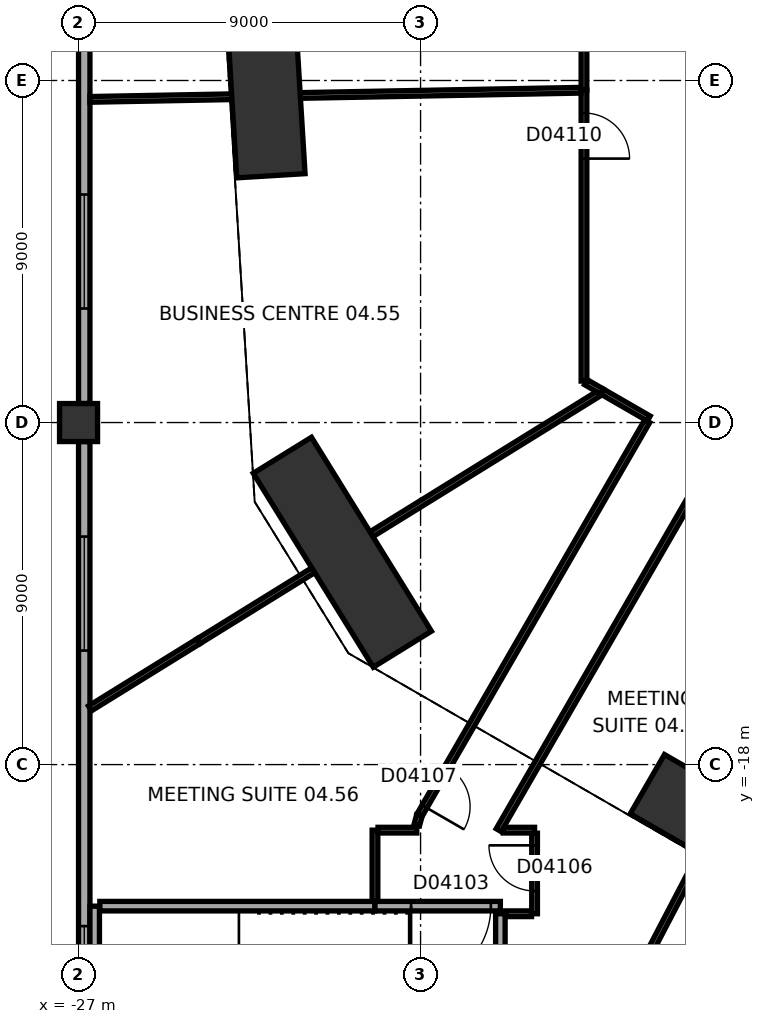
"""IFC4 building model, lengths in metres.
Left out: names, types, materials, properties, quantities, classifications, styles, units other than length and angle.
Written with IfcOpenShell. Run it as: python <this file> out.ifc"""

import sys

from ifc_helpers import new_model, si_unit, direction, frame, frame_2d, origin, origin_2d, place, context, subcontext, project, spatial, rectangle, extrude, element, fill, save


model = new_model("IFC4")
c1 = context("Model", 3, precision=1e-05, world=origin(), true_north=direction((0.0, 1.0)))
c2 = subcontext(c1, "Body", "Model", "MODEL_VIEW")
j1 = project(units=[si_unit("LENGTHUNIT", "METRE"), si_unit("PLANEANGLEUNIT", "RADIAN")], contexts=[c1])
p1 = place(None, origin())
s1 = spatial("IfcSite", under=j1, at=p1, CompositionType="ELEMENT")
p2 = place(p1, origin())
s2 = spatial("IfcBuilding", under=s1, at=p2, CompositionType="ELEMENT")
p3 = place(p2, frame((0.0, 0.0, 29.0)))
s3 = spatial("IfcBuildingStorey", under=s2, at=p3, CompositionType="ELEMENT", Elevation=29.0)
p4 = place(p3, frame((-22.066, -0.411, 0.0), z_axis=(0.0, 0.0, 1.0), x_axis=(0.061046797461, -0.99813490497, 0.0)))
e1 = element("IfcColumn", 1, at=p4, inside=s3, PredefinedType="COLUMN", context=c2, shape_type="SweptSolid", body=[
    extrude(rectangle(XDim=4.2, YDim=1.8, at=origin_2d()), origin(), (0.0, 0.0, 1.0), 5.5),
])
p5 = place(p3, frame((-20.058, -12.413, 0.0), z_axis=(0.0, 0.0, 1.0), x_axis=(0.526202050444, -0.850359572245, 0.0)))
e2 = element("IfcColumn", 2, at=p5, inside=s3, PredefinedType="COLUMN", context=c2, shape_type="SweptSolid", body=[
    extrude(rectangle(XDim=6.0, YDim=1.8, at=origin_2d()), origin(), (0.0, 0.0, 1.0), 5.5),
])
p6 = place(p3, frame((-10.213, -19.564, 0.0), z_axis=(0.0, 0.0, 1.0), x_axis=(0.866028021766, -0.499995465495, 0.0)))
e3 = element("IfcColumn", 3, at=p6, inside=s3, PredefinedType="COLUMN", context=c2, shape_type="SweptSolid", body=[
    extrude(rectangle(XDim=4.2, YDim=1.8, at=origin_2d()), origin(), (0.0, 0.0, 1.0), 5.5),
])
p7 = place(p3, frame((-27.0, -9.0, 0.0), z_axis=(0.0, 0.0, 1.0), x_axis=(1.0, 0.0, 0.0)))
e4 = element("IfcColumn", 4, at=p7, inside=s3, PredefinedType="COLUMN", context=c2, shape_type="SweptSolid", body=[
    extrude(rectangle(XDim=1.0, YDim=1.0, at=origin_2d()), origin(), (0.0, 0.0, 1.0), 5.5),
])
p8 = place(p3, frame((-26.85, 8.5, 0.0), z_axis=(0.0, 0.0, 1.0), x_axis=(0.0, -1.0, 0.0)))
e5 = element("IfcWall", 5, at=p8, inside=s3, PredefinedType="STANDARD", context=c2, shape_type="SweptSolid", body=[
    extrude(rectangle(XDim=17.0, YDim=0.3, at=frame_2d((8.5, 0.0))), origin(), (0.0, 0.0, 1.0), 3.95),
])
p9 = place(p8, frame((2.5, 0.0, 1.0)))
e6 = element("IfcOpeningElement", 6, at=p9, cuts=e5, PredefinedType="OPENING", context=c2, shape_type="SweptSolid", body=[
    extrude(rectangle(XDim=3.0, YDim=2.6, at=frame_2d((1.5, 1.3))), frame((0.0, 0.16, 0.0), z_axis=(0.0, -1.0, 0.0), x_axis=(1.0, 0.0, 0.0)), (0.0, 0.0, 1.0), 0.32),
])
p10 = place(p8, frame((11.5, 0.0, 1.0)))
e7 = element("IfcOpeningElement", 7, at=p10, cuts=e5, PredefinedType="OPENING", context=c2, shape_type="SweptSolid", body=[
    extrude(rectangle(XDim=3.0, YDim=2.6, at=frame_2d((1.5, 1.3))), frame((0.0, 0.16, 0.0), z_axis=(0.0, -1.0, 0.0), x_axis=(1.0, 0.0, 0.0)), (0.0, 0.0, 1.0), 0.32),
])
p11 = place(p3, frame((-26.85, -9.5, 0.0), z_axis=(0.0, 0.0, 1.0), x_axis=(0.0, -1.0, 0.0)))
e8 = element("IfcWall", 8, at=p11, inside=s3, PredefinedType="STANDARD", context=c2, shape_type="SweptSolid", body=[
    extrude(rectangle(XDim=17.0, YDim=0.3, at=frame_2d((8.5, 0.0))), origin(), (0.0, 0.0, 1.0), 3.95),
])
p12 = place(p11, frame((2.5, 0.0, 1.0)))
e9 = element("IfcOpeningElement", 9, at=p12, cuts=e8, PredefinedType="OPENING", context=c2, shape_type="SweptSolid", body=[
    extrude(rectangle(XDim=3.0, YDim=2.6, at=frame_2d((1.5, 1.3))), frame((0.0, 0.16, 0.0), z_axis=(0.0, -1.0, 0.0), x_axis=(1.0, 0.0, 0.0)), (0.0, 0.0, 1.0), 0.32),
])
p13 = place(p11, frame((12.75, 0.0, 1.0)))
e10 = element("IfcOpeningElement", 10, at=p13, cuts=e8, PredefinedType="OPENING", context=c2, shape_type="SweptSolid", body=[
    extrude(rectangle(XDim=3.0, YDim=2.6, at=frame_2d((1.5, 1.3))), frame((0.0, 0.16, 0.0), z_axis=(0.0, -1.0, 0.0), x_axis=(1.0, 0.0, 0.0)), (0.0, 0.0, 1.0), 0.32),
])
p14 = place(p3, frame((-12.686, -24.3, 0.0), z_axis=(0.0, 0.0, 1.0), x_axis=(0.462800821993, 0.88646229427, 0.0)))
e11 = element("IfcWall", 11, at=p14, inside=s3, PredefinedType="PARTITIONING", context=c2, shape_type="SweptSolid", body=[
    extrude(rectangle(XDim=4.441, YDim=0.15, at=frame_2d((2.221, 0.0))), origin(), (0.0, 0.0, 1.0), 5.15),
])
p15 = place(p3, frame((-15.9, -21.925, 0.0), z_axis=(0.0, 0.0, 1.0), x_axis=(0.0, -1.0, 0.0)))
e12 = element("IfcWall", 12, at=p15, inside=s3, PredefinedType="SOLIDWALL", context=c2, shape_type="SweptSolid", body=[
    extrude(rectangle(XDim=4.515, YDim=0.25, at=frame_2d((2.257, 0.0))), origin(), (0.0, 0.0, 1.0), 5.15),
])
p16 = place(p3, frame((-15.08, -21.925, 0.0), z_axis=(0.0, 0.0, 1.0), x_axis=(-1.0, 0.0, 0.0)))
e13 = element("IfcWall", 13, at=p16, inside=s3, PredefinedType="PARTITIONING", context=c2, shape_type="SweptSolid", body=[
    extrude(rectangle(XDim=0.68, YDim=0.15, at=frame_2d((0.34, 0.0))), origin(), (0.0, 0.0, 1.0), 5.15),
])
p17 = place(p3, frame((-26.44, -21.725, 0.0), z_axis=(0.0, 0.0, 1.0), x_axis=(1.0, 0.0, 0.0)))
e14 = element("IfcWall", 14, at=p17, inside=s3, PredefinedType="SOLIDWALL", context=c2, shape_type="SweptSolid", body=[
    extrude(rectangle(XDim=7.24, YDim=0.25, at=frame_2d((3.62, 0.0))), origin(), (0.0, 0.0, 1.0), 5.15),
])
p18 = place(p3, frame((-19.2, -21.725, 0.0), z_axis=(0.0, 0.0, 1.0), x_axis=(1.0, 0.0, 0.0)))
e15 = element("IfcWall", 15, at=p18, inside=s3, PredefinedType="SOLIDWALL", context=c2, shape_type="SweptSolid", body=[
    extrude(rectangle(XDim=3.3, YDim=0.25, at=frame_2d((1.65, 0.0))), origin(), (0.0, 0.0, 1.0), 5.15),
])
p19 = place(p18, frame((0.95, 0.0, 0.0)))
e16 = element("IfcOpeningElement", 16, at=p19, cuts=e15, PredefinedType="OPENING", context=c2, shape_type="SweptSolid", body=[
    extrude(rectangle(XDim=2.1, YDim=2.4, at=frame_2d((1.05, 1.2))), frame((0.0, 0.135, 0.0), z_axis=(0.0, -1.0, 0.0), x_axis=(1.0, 0.0, 0.0)), (0.0, 0.0, 1.0), 0.27),
])
p20 = place(p3, frame((-19.2, -21.585, 0.0), z_axis=(0.0, 0.0, 1.0), x_axis=(0.0, 1.0, 0.0)))
e17 = element("IfcWall", 17, at=p20, inside=s3, PredefinedType="PARTITIONING", context=c2, shape_type="SweptSolid", body=[
    extrude(rectangle(XDim=1.86, YDim=0.15, at=frame_2d((0.93, 0.0))), origin(), (0.0, 0.0, 1.0), 5.15),
])
p21 = place(p3, frame((-15.0, -19.805, 0.0), z_axis=(0.0, 0.0, 1.0), x_axis=(0.0, -1.0, 0.0)))
e18 = element("IfcWall", 18, at=p21, inside=s3, PredefinedType="PARTITIONING", context=c2, shape_type="SweptSolid", body=[
    extrude(rectangle(XDim=2.12, YDim=0.15, at=frame_2d((1.06, 0.0))), origin(), (0.0, 0.0, 1.0), 5.15),
])
p22 = place(p21, frame((0.32, 0.0, 0.0)))
e19 = element("IfcOpeningElement", 19, at=p22, cuts=e18, PredefinedType="OPENING", context=c2, shape_type="SweptSolid", body=[
    extrude(rectangle(XDim=1.2, YDim=2.1, at=frame_2d((0.6, 1.05))), frame((0.0, 0.085, 0.0), z_axis=(0.0, -1.0, 0.0), x_axis=(1.0, 0.0, 0.0)), (0.0, 0.0, 1.0), 0.17),
])
p23 = place(p3, frame((-19.12, -19.725, 0.0), z_axis=(0.0, 0.0, 1.0), x_axis=(1.0, 0.0, 0.0)))
e20 = element("IfcWall", 20, at=p23, inside=s3, PredefinedType="PARTITIONING", context=c2, shape_type="SweptSolid", body=[
    extrude(rectangle(XDim=1.02, YDim=0.15, at=frame_2d((0.51, 0.0))), origin(), (0.0, 0.0, 1.0), 5.15),
])
p24 = place(p3, frame((-15.825, -19.725, 0.0), z_axis=(0.0, 0.0, 1.0), x_axis=(1.0, 0.0, 0.0)))
e21 = element("IfcWall", 21, at=p24, inside=s3, PredefinedType="PARTITIONING", context=c2, shape_type="SweptSolid", body=[
    extrude(rectangle(XDim=0.825, YDim=0.15, at=frame_2d((0.413, 0.0))), origin(), (0.0, 0.0, 1.0), 5.15),
])
p25 = place(p3, frame((-18.1, -19.593, 0.0), z_axis=(0.0, 0.0, 1.0), x_axis=(0.260139468531, 0.965571052234, 0.0)))
e22 = element("IfcWall", 22, at=p25, inside=s3, PredefinedType="PARTITIONING", context=c2, shape_type="SweptSolid", body=[
    extrude(rectangle(XDim=0.264, YDim=0.15, at=frame_2d((0.132, 0.0))), origin(), (0.0, 0.0, 1.0), 5.15),
])
p26 = place(p3, frame((-18.021, -19.321, 0.0), z_axis=(0.0, 0.0, 1.0), x_axis=(0.500403049961, 0.865792577694, 0.0)))
e23 = element("IfcWall", 23, at=p26, inside=s3, PredefinedType="PARTITIONING", context=c2, shape_type="SweptSolid", body=[
    extrude(rectangle(XDim=11.963, YDim=0.15, at=frame_2d((5.982, 0.0))), origin(), (0.0, 0.0, 1.0), 5.15),
])
p27 = place(p26, frame((0.25, 0.0, 0.0)))
e24 = element("IfcOpeningElement", 24, at=p27, cuts=e23, PredefinedType="OPENING", context=c2, shape_type="SweptSolid", body=[
    extrude(rectangle(XDim=1.2, YDim=2.1, at=frame_2d((0.6, 1.05))), frame((0.0, 0.085, 0.0), z_axis=(0.0, -1.0, 0.0), x_axis=(1.0, 0.0, 0.0)), (0.0, 0.0, 1.0), 0.17),
])
p28 = place(p3, frame((-23.843, -14.754, 0.0), z_axis=(0.0, 0.0, 1.0), x_axis=(-0.850333278488, -0.526244539635, 0.0)))
e25 = element("IfcWall", 25, at=p28, inside=s3, PredefinedType="PARTITIONING", context=c2, shape_type="SweptSolid", body=[
    extrude(rectangle(XDim=3.36, YDim=0.15, at=frame_2d((1.68, 0.0))), origin(), (0.0, 0.0, 1.0), 5.15),
])
p29 = place(p3, frame((-23.843, -14.754, 0.0), z_axis=(0.0, 0.0, 1.0), x_axis=(0.850369165181, 0.526186547633, 0.0)))
e26 = element("IfcWall", 26, at=p29, inside=s3, PredefinedType="PARTITIONING", context=c2, shape_type="SweptSolid", body=[
    extrude(rectangle(XDim=3.551, YDim=0.15, at=frame_2d((1.775, 0.0))), origin(), (0.0, 0.0, 1.0), 5.15),
])
p30 = place(p3, frame((-19.293, -11.939, 0.0), z_axis=(0.0, 0.0, 1.0), x_axis=(0.85034374829, 0.526227621609, 0.0)))
e27 = element("IfcWall", 27, at=p30, inside=s3, PredefinedType="PARTITIONING", context=c2, shape_type="SweptSolid", body=[
    extrude(rectangle(XDim=7.016, YDim=0.15, at=frame_2d((3.508, 0.0))), origin(), (0.0, 0.0, 1.0), 5.15),
])
p31 = place(p3, frame((-10.303, -9.963, 0.0), z_axis=(0.0, 0.0, 1.0), x_axis=(-0.500409628778, -0.865788775295, 0.0)))
e28 = element("IfcWall", 28, at=p31, inside=s3, PredefinedType="PARTITIONING", context=c2, shape_type="SweptSolid", body=[
    extrude(rectangle(XDim=11.275, YDim=0.15, at=frame_2d((5.637, 0.0))), origin(), (0.0, 0.0, 1.0), 5.15),
])
p32 = place(p3, frame((-11.995, -8.894, 0.0), z_axis=(0.0, 0.0, 1.0), x_axis=(-0.866076810767, 0.499910949922, 0.0)))
e29 = element("IfcWall", 29, at=p32, inside=s3, PredefinedType="PARTITIONING", context=c2, shape_type="SweptSolid", body=[
    extrude(rectangle(XDim=1.42, YDim=0.15, at=frame_2d((0.71, 0.0))), origin(), (0.0, 0.0, 1.0), 5.15),
])
p33 = place(p3, frame((-13.648, -7.939, 0.0), z_axis=(0.0, 0.0, 1.0), x_axis=(0.865585916185, -0.500760443428, 0.0)))
e30 = element("IfcWall", 30, at=p33, inside=s3, PredefinedType="PARTITIONING", context=c2, shape_type="SweptSolid", body=[
    extrude(rectangle(XDim=0.489, YDim=0.15, at=frame_2d((0.244, 0.0))), origin(), (0.0, 0.0, 1.0), 5.15),
])
p34 = place(p3, frame((-13.7, -7.909, 0.0), z_axis=(0.0, 0.0, 1.0), x_axis=(0.0, 1.0, 0.0)))
e31 = element("IfcWall", 31, at=p34, inside=s3, PredefinedType="PARTITIONING", context=c2, shape_type="SweptSolid", body=[
    extrude(rectangle(XDim=7.655, YDim=0.15, at=frame_2d((3.827, 0.0))), origin(), (0.0, 0.0, 1.0), 5.15),
])
p35 = place(p34, frame((5.854, 0.0, 0.0)))
e32 = element("IfcOpeningElement", 32, at=p35, cuts=e31, PredefinedType="OPENING", context=c2, shape_type="SweptSolid", body=[
    extrude(rectangle(XDim=1.2, YDim=2.1, at=frame_2d((0.6, 1.05))), frame((0.0, 0.085, 0.0), z_axis=(0.0, -1.0, 0.0), x_axis=(1.0, 0.0, 0.0)), (0.0, 0.0, 1.0), 0.17),
])
p36 = place(p3, frame((-22.967, -0.427, 0.0), z_axis=(0.0, 0.0, 1.0), x_axis=(-0.999826372694, -0.018633959993, 0.0)))
e33 = element("IfcWall", 33, at=p36, inside=s3, PredefinedType="PARTITIONING", context=c2, shape_type="SweptSolid", body=[
    extrude(rectangle(XDim=3.734, YDim=0.15, at=frame_2d((1.867, 0.0))), origin(), (0.0, 0.0, 1.0), 5.15),
])
p37 = place(p3, frame((-13.78, -0.257, 0.0), z_axis=(0.0, 0.0, 1.0), x_axis=(-0.999826849708, -0.018608347649, 0.0)))
e34 = element("IfcWall", 34, at=p37, inside=s3, PredefinedType="PARTITIONING", context=c2, shape_type="SweptSolid", body=[
    extrude(rectangle(XDim=7.386, YDim=0.15, at=frame_2d((3.693, 0.0))), origin(), (0.0, 0.0, 1.0), 5.15),
])
p38 = place(p3, frame((-13.7, -0.255, 0.0), z_axis=(0.0, 0.0, 1.0), x_axis=(0.0, 1.0, 0.0)))
e35 = element("IfcWall", 35, at=p38, inside=s3, PredefinedType="PARTITIONING", context=c2, shape_type="SweptSolid", body=[
    extrude(rectangle(XDim=7.616, YDim=0.15, at=frame_2d((3.808, 0.0))), origin(), (0.0, 0.0, 1.0), 5.15),
])
p39 = place(p38, frame((5.866, 0.0, 0.0)))
e36 = element("IfcOpeningElement", 36, at=p39, cuts=e35, PredefinedType="OPENING", context=c2, shape_type="SweptSolid", body=[
    extrude(rectangle(XDim=1.2, YDim=2.1, at=frame_2d((0.6, 1.05))), frame((0.0, 0.085, 0.0), z_axis=(0.0, -1.0, 0.0), x_axis=(1.0, 0.0, 0.0)), (0.0, 0.0, 1.0), 0.17),
])
p40 = place(p3, frame((-26.575, -21.725, 0.0), z_axis=(0.0, 0.0, 1.0), x_axis=(0.0, -1.0, 0.0)))
e37 = element("IfcWall", 37, at=p40, inside=s3, PredefinedType="SOLIDWALL", context=c2, shape_type="SweptSolid", body=[
    extrude(rectangle(XDim=4.975, YDim=0.25, at=frame_2d((2.487, 0.0))), origin(), (0.0, 0.0, 1.0), 5.15),
])
p41 = place(p10, origin())
e38 = element("IfcWindow", 38, at=p41, inside=s3, PartitioningType="SINGLE_PANEL", PredefinedType="WINDOW", context=c2, shape_type="SweptSolid", body=[
    extrude(rectangle(XDim=3.0, YDim=2.6, at=frame_2d((1.5, 1.3))), frame((0.0, 0.03, 0.0), z_axis=(0.0, -1.0, 0.0), x_axis=(1.0, 0.0, 0.0)), (0.0, 0.0, 1.0), 0.06),
])
fill(e7, e38)
p42 = place(p12, origin())
e39 = element("IfcWindow", 39, at=p42, inside=s3, PartitioningType="SINGLE_PANEL", PredefinedType="WINDOW", context=c2, shape_type="SweptSolid", body=[
    extrude(rectangle(XDim=3.0, YDim=2.6, at=frame_2d((1.5, 1.3))), frame((0.0, 0.03, 0.0), z_axis=(0.0, -1.0, 0.0), x_axis=(1.0, 0.0, 0.0)), (0.0, 0.0, 1.0), 0.06),
])
fill(e9, e39)
p43 = place(p13, origin())
e40 = element("IfcWindow", 40, at=p43, inside=s3, PartitioningType="SINGLE_PANEL", PredefinedType="WINDOW", context=c2, shape_type="SweptSolid", body=[
    extrude(rectangle(XDim=3.0, YDim=2.6, at=frame_2d((1.5, 1.3))), frame((0.0, 0.03, 0.0), z_axis=(0.0, -1.0, 0.0), x_axis=(1.0, 0.0, 0.0)), (0.0, 0.0, 1.0), 0.06),
])
fill(e10, e40)
p44 = place(p19, frame((2.1, 0.0, 0.0), z_axis=(0.0, 0.0, 1.0), x_axis=(-1.0, 0.0, 0.0)))
e41 = element("IfcDoor", 41, at=p44, inside=s3, OperationType="DOUBLE_DOOR_SINGLE_SWING", PredefinedType="DOOR", context=c2, shape_type="SweptSolid", body=[
    extrude(rectangle(XDim=2.1, YDim=2.4, at=frame_2d((1.05, 1.2))), frame((0.0, 0.025, 0.0), z_axis=(0.0, -1.0, 0.0), x_axis=(1.0, 0.0, 0.0)), (0.0, 0.0, 1.0), 0.05),
])
fill(e16, e41)
p45 = place(p22, origin())
e42 = element("IfcDoor", 42, at=p45, inside=s3, OperationType="SINGLE_SWING_LEFT", PredefinedType="DOOR", context=c2, shape_type="SweptSolid", body=[
    extrude(rectangle(XDim=1.2, YDim=2.1, at=frame_2d((0.6, 1.05))), frame((0.0, 0.025, 0.0), z_axis=(0.0, -1.0, 0.0), x_axis=(1.0, 0.0, 0.0)), (0.0, 0.0, 1.0), 0.05),
])
fill(e19, e42)
p46 = place(p27, origin())
e43 = element("IfcDoor", 43, at=p46, inside=s3, OperationType="SINGLE_SWING_LEFT", PredefinedType="DOOR", context=c2, shape_type="SweptSolid", body=[
    extrude(rectangle(XDim=1.2, YDim=2.1, at=frame_2d((0.6, 1.05))), frame((0.0, 0.025, 0.0), z_axis=(0.0, -1.0, 0.0), x_axis=(1.0, 0.0, 0.0)), (0.0, 0.0, 1.0), 0.05),
])
fill(e24, e43)
p47 = place(p35, origin())
e44 = element("IfcDoor", 44, at=p47, inside=s3, OperationType="SINGLE_SWING_LEFT", PredefinedType="DOOR", context=c2, shape_type="SweptSolid", body=[
    extrude(rectangle(XDim=1.2, YDim=2.1, at=frame_2d((0.6, 1.05))), frame((0.0, 0.025, 0.0), z_axis=(0.0, -1.0, 0.0), x_axis=(1.0, 0.0, 0.0)), (0.0, 0.0, 1.0), 0.05),
])
fill(e32, e44)
save(model, sys.argv[1])
